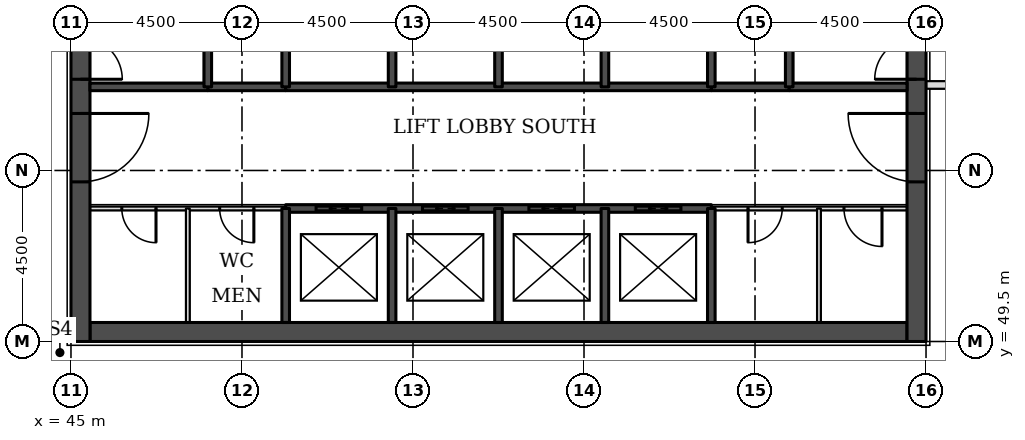
"""IFC4 building model, lengths in metres.
Left out: names, types, materials, properties, quantities, classifications, styles, units other than length and angle.
Written with IfcOpenShell. Run it as: python <this file> out.ifc"""

import sys

from ifc_helpers import new_model, si_unit, direction, frame, frame_2d, origin, place, context, subcontext, project, spatial, rectangle, extrude, element, fill, save


model = new_model("IFC4")
c1 = context("Model", 3, precision=1e-05, world=origin(), true_north=direction((0.0, 1.0)))
c2 = subcontext(c1, "Body", "Model", "MODEL_VIEW")
j1 = project(units=[si_unit("LENGTHUNIT", "METRE"), si_unit("PLANEANGLEUNIT", "RADIAN")], contexts=[c1])
p1 = place(None, origin())
s1 = spatial("IfcSite", under=j1, at=p1, CompositionType="ELEMENT")
p2 = place(p1, origin())
s2 = spatial("IfcBuilding", under=s1, at=p2, CompositionType="ELEMENT")
p3 = place(p2, frame((0.0, 0.0, 69.3)))
s3 = spatial("IfcBuildingStorey", under=s2, at=p3, CompositionType="ELEMENT", Elevation=69.3)
p4 = place(p3, frame((45.5, 49.75, 0.0), z_axis=(0.0, 0.0, 1.0), x_axis=(1.0, 0.0, 0.0)))
e1 = element("IfcWall", 1, at=p4, inside=s3, PredefinedType="SHEAR", context=c2, shape_type="SweptSolid", body=[
    extrude(rectangle(XDim=21.5, YDim=0.5, at=frame_2d((10.75, 0.0))), origin(), (0.0, 0.0, 1.0), 5.0),
])
p5 = place(p3, frame((45.25, 49.5, 0.0), z_axis=(0.0, 0.0, 1.0), x_axis=(0.0, 1.0, 0.0)))
e2 = element("IfcWall", 2, at=p5, inside=s3, PredefinedType="SHEAR", context=c2, shape_type="SweptSolid", body=[
    extrude(rectangle(XDim=22.5, YDim=0.5, at=frame_2d((11.25, 0.0))), origin(), (0.0, 0.0, 1.0), 5.0),
])
p6 = place(p5, frame((4.2, 0.0, 0.0)))
e3 = element("IfcOpeningElement", 3, at=p6, cuts=e2, PredefinedType="OPENING", context=c2, shape_type="SweptSolid", body=[
    extrude(rectangle(XDim=1.8, YDim=2.1, at=frame_2d((0.9, 1.05))), frame((0.0, 0.26, 0.0), z_axis=(0.0, -1.0, 0.0), x_axis=(1.0, 0.0, 0.0)), (0.0, 0.0, 1.0), 0.52),
])
p7 = place(p5, frame((6.9, 0.0, 0.0)))
e4 = element("IfcOpeningElement", 4, at=p7, cuts=e2, PredefinedType="OPENING", context=c2, shape_type="SweptSolid", body=[
    extrude(rectangle(XDim=1.1, YDim=2.1, at=frame_2d((0.55, 1.05))), frame((0.0, 0.26, 0.0), z_axis=(0.0, -1.0, 0.0), x_axis=(1.0, 0.0, 0.0)), (0.0, 0.0, 1.0), 0.52),
])
p8 = place(p5, frame((13.6, 0.0, 0.0)))
e5 = element("IfcOpeningElement", 5, at=p8, cuts=e2, PredefinedType="OPENING", context=c2, shape_type="SweptSolid", body=[
    extrude(rectangle(XDim=1.1, YDim=2.1, at=frame_2d((0.55, 1.05))), frame((0.0, 0.26, 0.0), z_axis=(0.0, -1.0, 0.0), x_axis=(1.0, 0.0, 0.0)), (0.0, 0.0, 1.0), 0.52),
])
p9 = place(p5, frame((16.5, 0.0, 0.0)))
e6 = element("IfcOpeningElement", 6, at=p9, cuts=e2, PredefinedType="OPENING", context=c2, shape_type="SweptSolid", body=[
    extrude(rectangle(XDim=1.8, YDim=2.1, at=frame_2d((0.9, 1.05))), frame((0.0, 0.26, 0.0), z_axis=(0.0, -1.0, 0.0), x_axis=(1.0, 0.0, 0.0)), (0.0, 0.0, 1.0), 0.52),
])
p10 = place(p3, frame((67.25, 49.5, 0.0), z_axis=(0.0, 0.0, 1.0), x_axis=(0.0, 1.0, 0.0)))
e7 = element("IfcWall", 7, at=p10, inside=s3, PredefinedType="SHEAR", context=c2, shape_type="SweptSolid", body=[
    extrude(rectangle(XDim=22.5, YDim=0.5, at=frame_2d((11.25, 0.0))), origin(), (0.0, 0.0, 1.0), 5.0),
])
p11 = place(p10, frame((4.2, 0.0, 0.0)))
e8 = element("IfcOpeningElement", 8, at=p11, cuts=e7, PredefinedType="OPENING", context=c2, shape_type="SweptSolid", body=[
    extrude(rectangle(XDim=1.8, YDim=2.1, at=frame_2d((0.9, 1.05))), frame((0.0, 0.26, 0.0), z_axis=(0.0, -1.0, 0.0), x_axis=(1.0, 0.0, 0.0)), (0.0, 0.0, 1.0), 0.52),
])
p12 = place(p10, frame((6.9, 0.0, 0.0)))
e9 = element("IfcOpeningElement", 9, at=p12, cuts=e7, PredefinedType="OPENING", context=c2, shape_type="SweptSolid", body=[
    extrude(rectangle(XDim=1.1, YDim=2.1, at=frame_2d((0.55, 1.05))), frame((0.0, 0.26, 0.0), z_axis=(0.0, -1.0, 0.0), x_axis=(1.0, 0.0, 0.0)), (0.0, 0.0, 1.0), 0.52),
])
p13 = place(p10, frame((13.6, 0.0, 0.0)))
e10 = element("IfcOpeningElement", 10, at=p13, cuts=e7, PredefinedType="OPENING", context=c2, shape_type="SweptSolid", body=[
    extrude(rectangle(XDim=1.1, YDim=2.1, at=frame_2d((0.55, 1.05))), frame((0.0, 0.26, 0.0), z_axis=(0.0, -1.0, 0.0), x_axis=(1.0, 0.0, 0.0)), (0.0, 0.0, 1.0), 0.52),
])
p14 = place(p10, frame((16.5, 0.0, 0.0)))
e11 = element("IfcOpeningElement", 11, at=p14, cuts=e7, PredefinedType="OPENING", context=c2, shape_type="SweptSolid", body=[
    extrude(rectangle(XDim=1.8, YDim=2.1, at=frame_2d((0.9, 1.05))), frame((0.0, 0.26, 0.0), z_axis=(0.0, -1.0, 0.0), x_axis=(1.0, 0.0, 0.0)), (0.0, 0.0, 1.0), 0.52),
])
p15 = place(p3, frame((67.5, 56.25, 0.0), z_axis=(0.0, 0.0, 1.0), x_axis=(1.0, 0.0, 0.0)))
e12 = element("IfcWall", 12, at=p15, inside=s3, PredefinedType="PARTITIONING", context=c2, shape_type="SweptSolid", body=[
    extrude(rectangle(XDim=2.0, YDim=0.2, at=frame_2d((1.0, 0.0))), origin(), (0.0, 0.0, 1.0), 4.85),
])
p16 = place(p3, frame((45.5, 53.0, 0.0), z_axis=(0.0, 0.0, 1.0), x_axis=(1.0, 0.0, 0.0)))
e13 = element("IfcWall", 13, at=p16, inside=s3, PredefinedType="PARTITIONING", context=c2, shape_type="SweptSolid", body=[
    extrude(rectangle(XDim=5.15, YDim=0.1, at=frame_2d((2.575, 0.0))), origin(), (0.0, 0.0, 1.0), 4.85),
])
p17 = place(p16, frame((0.837, 0.0, 0.0)))
e14 = element("IfcOpeningElement", 14, at=p17, cuts=e13, PredefinedType="OPENING", context=c2, shape_type="SweptSolid", body=[
    extrude(rectangle(XDim=0.9, YDim=2.1, at=frame_2d((0.45, 1.05))), frame((0.0, 0.06, 0.0), z_axis=(0.0, -1.0, 0.0), x_axis=(1.0, 0.0, 0.0)), (0.0, 0.0, 1.0), 0.12),
])
p18 = place(p16, frame((3.413, 0.0, 0.0)))
e15 = element("IfcOpeningElement", 15, at=p18, cuts=e13, PredefinedType="OPENING", context=c2, shape_type="SweptSolid", body=[
    extrude(rectangle(XDim=0.9, YDim=2.1, at=frame_2d((0.45, 1.05))), frame((0.0, 0.06, 0.0), z_axis=(0.0, -1.0, 0.0), x_axis=(1.0, 0.0, 0.0)), (0.0, 0.0, 1.0), 0.12),
])
p19 = place(p3, frame((61.85, 53.0, 0.0), z_axis=(0.0, 0.0, 1.0), x_axis=(1.0, 0.0, 0.0)))
e16 = element("IfcWall", 16, at=p19, inside=s3, PredefinedType="PARTITIONING", context=c2, shape_type="SweptSolid", body=[
    extrude(rectangle(XDim=5.15, YDim=0.1, at=frame_2d((2.575, 0.0))), origin(), (0.0, 0.0, 1.0), 4.85),
])
p20 = place(p19, frame((3.491, 0.0, 0.0)))
e17 = element("IfcOpeningElement", 17, at=p20, cuts=e16, PredefinedType="OPENING", context=c2, shape_type="SweptSolid", body=[
    extrude(rectangle(XDim=1.0, YDim=2.1, at=frame_2d((0.5, 1.05))), frame((0.0, 0.06, 0.0), z_axis=(0.0, -1.0, 0.0), x_axis=(1.0, 0.0, 0.0)), (0.0, 0.0, 1.0), 0.12),
])
p21 = place(p19, frame((0.966, 0.0, 0.0)))
e18 = element("IfcOpeningElement", 18, at=p21, cuts=e16, PredefinedType="OPENING", context=c2, shape_type="SweptSolid", body=[
    extrude(rectangle(XDim=0.9, YDim=2.1, at=frame_2d((0.45, 1.05))), frame((0.0, 0.06, 0.0), z_axis=(0.0, -1.0, 0.0), x_axis=(1.0, 0.0, 0.0)), (0.0, 0.0, 1.0), 0.12),
])
p22 = place(p3, frame((50.65, 53.0, 0.0), z_axis=(0.0, 0.0, 1.0), x_axis=(1.0, 0.0, 0.0)))
e19 = element("IfcWall", 19, at=p22, inside=s3, PredefinedType="SOLIDWALL", context=c2, shape_type="SweptSolid", body=[
    extrude(rectangle(XDim=11.2, YDim=0.2, at=frame_2d((5.6, 0.0))), origin(), (0.0, 0.0, 1.0), 4.85),
])
p23 = place(p22, frame((0.8, 0.0, 0.0)))
e20 = element("IfcOpeningElement", 20, at=p23, cuts=e19, PredefinedType="OPENING", context=c2, shape_type="SweptSolid", body=[
    extrude(rectangle(XDim=1.2, YDim=2.1, at=frame_2d((0.6, 1.05))), frame((0.0, 0.11, 0.0), z_axis=(0.0, -1.0, 0.0), x_axis=(1.0, 0.0, 0.0)), (0.0, 0.0, 1.0), 0.22),
])
p24 = place(p22, frame((3.6, 0.0, 0.0)))
e21 = element("IfcOpeningElement", 21, at=p24, cuts=e19, PredefinedType="OPENING", context=c2, shape_type="SweptSolid", body=[
    extrude(rectangle(XDim=1.2, YDim=2.1, at=frame_2d((0.6, 1.05))), frame((0.0, 0.11, 0.0), z_axis=(0.0, -1.0, 0.0), x_axis=(1.0, 0.0, 0.0)), (0.0, 0.0, 1.0), 0.22),
])
p25 = place(p22, frame((6.4, 0.0, 0.0)))
e22 = element("IfcOpeningElement", 22, at=p25, cuts=e19, PredefinedType="OPENING", context=c2, shape_type="SweptSolid", body=[
    extrude(rectangle(XDim=1.2, YDim=2.1, at=frame_2d((0.6, 1.05))), frame((0.0, 0.11, 0.0), z_axis=(0.0, -1.0, 0.0), x_axis=(1.0, 0.0, 0.0)), (0.0, 0.0, 1.0), 0.22),
])
p26 = place(p22, frame((9.2, 0.0, 0.0)))
e23 = element("IfcOpeningElement", 23, at=p26, cuts=e19, PredefinedType="OPENING", context=c2, shape_type="SweptSolid", body=[
    extrude(rectangle(XDim=1.2, YDim=2.1, at=frame_2d((0.6, 1.05))), frame((0.0, 0.11, 0.0), z_axis=(0.0, -1.0, 0.0), x_axis=(1.0, 0.0, 0.0)), (0.0, 0.0, 1.0), 0.22),
])
for number, where, z_axis, x_axis in (
    (24, (48.6, 56.2, 0.0), (0.0, 0.0, 1.0), (1.0, 0.0, 0.0)),
    (25, (61.85, 56.2, 0.0), (0.0, 0.0, 1.0), (1.0, 0.0, 0.0)),
):
    element("IfcWall", number, at=place(p3, frame(where, z_axis=z_axis, x_axis=x_axis)), inside=s3, PredefinedType="SOLIDWALL", context=c2, shape_type="SweptSolid", body=[
        extrude(rectangle(XDim=2.05, YDim=0.2, at=frame_2d((1.025, 0.0))), origin(), (0.0, 0.0, 1.0), 4.85),
    ])
p27 = place(p3, frame((45.5, 56.2, 0.0), z_axis=(0.0, 0.0, 1.0), x_axis=(1.0, 0.0, 0.0)))
e26 = element("IfcWall", 26, at=p27, inside=s3, PredefinedType="SOLIDWALL", context=c2, shape_type="SweptSolid", body=[
    extrude(rectangle(XDim=3.1, YDim=0.2, at=frame_2d((1.55, 0.0))), origin(), (0.0, 0.0, 1.0), 4.85),
])
p28 = place(p3, frame((50.65, 56.2, 0.0), z_axis=(0.0, 0.0, 1.0), x_axis=(1.0, 0.0, 0.0)))
e27 = element("IfcWall", 27, at=p28, inside=s3, PredefinedType="SOLIDWALL", context=c2, shape_type="SweptSolid", body=[
    extrude(rectangle(XDim=11.2, YDim=0.2, at=frame_2d((5.6, 0.0))), origin(), (0.0, 0.0, 1.0), 4.85),
])
p29 = place(p3, frame((63.9, 56.2, 0.0), z_axis=(0.0, 0.0, 1.0), x_axis=(1.0, 0.0, 0.0)))
e28 = element("IfcWall", 28, at=p29, inside=s3, PredefinedType="SOLIDWALL", context=c2, shape_type="SweptSolid", body=[
    extrude(rectangle(XDim=3.1, YDim=0.2, at=frame_2d((1.55, 0.0))), origin(), (0.0, 0.0, 1.0), 4.85),
])
p30 = place(p3, frame((48.075, 50.0, 0.0), z_axis=(0.0, 0.0, 1.0), x_axis=(0.0, 1.0, 0.0)))
e29 = element("IfcWall", 29, at=p30, inside=s3, PredefinedType="PARTITIONING", context=c2, shape_type="SweptSolid", body=[
    extrude(rectangle(XDim=3.0, YDim=0.1, at=frame_2d((1.5, 0.0))), origin(), (0.0, 0.0, 1.0), 4.85),
])
p31 = place(p3, frame((48.6, 56.2, 0.0), z_axis=(0.0, 0.0, 1.0), x_axis=(0.0, 1.0, 0.0)))
e30 = element("IfcWall", 30, at=p31, inside=s3, PredefinedType="SOLIDWALL", context=c2, shape_type="SweptSolid", body=[
    extrude(rectangle(XDim=5.8, YDim=0.2, at=frame_2d((2.9, 0.0))), origin(), (0.0, 0.0, 1.0), 4.85),
])
p32 = place(p3, frame((50.65, 50.0, 0.0), z_axis=(0.0, 0.0, 1.0), x_axis=(0.0, 1.0, 0.0)))
e31 = element("IfcWall", 31, at=p32, inside=s3, PredefinedType="SOLIDWALL", context=c2, shape_type="SweptSolid", body=[
    extrude(rectangle(XDim=3.0, YDim=0.2, at=frame_2d((1.5, 0.0))), origin(), (0.0, 0.0, 1.0), 4.85),
])
p33 = place(p3, frame((50.65, 56.2, 0.0), z_axis=(0.0, 0.0, 1.0), x_axis=(0.0, 1.0, 0.0)))
e32 = element("IfcWall", 32, at=p33, inside=s3, PredefinedType="SOLIDWALL", context=c2, shape_type="SweptSolid", body=[
    extrude(rectangle(XDim=2.8, YDim=0.2, at=frame_2d((1.4, 0.0))), origin(), (0.0, 0.0, 1.0), 4.85),
])
p34 = place(p3, frame((53.45, 50.0, 0.0), z_axis=(0.0, 0.0, 1.0), x_axis=(0.0, 1.0, 0.0)))
e33 = element("IfcWall", 33, at=p34, inside=s3, PredefinedType="SOLIDWALL", context=c2, shape_type="SweptSolid", body=[
    extrude(rectangle(XDim=3.0, YDim=0.2, at=frame_2d((1.5, 0.0))), origin(), (0.0, 0.0, 1.0), 4.85),
])
p35 = place(p3, frame((53.45, 56.2, 0.0), z_axis=(0.0, 0.0, 1.0), x_axis=(0.0, 1.0, 0.0)))
e34 = element("IfcWall", 34, at=p35, inside=s3, PredefinedType="SOLIDWALL", context=c2, shape_type="SweptSolid", body=[
    extrude(rectangle(XDim=2.8, YDim=0.2, at=frame_2d((1.4, 0.0))), origin(), (0.0, 0.0, 1.0), 4.85),
])
p36 = place(p3, frame((56.25, 50.0, 0.0), z_axis=(0.0, 0.0, 1.0), x_axis=(0.0, 1.0, 0.0)))
e35 = element("IfcWall", 35, at=p36, inside=s3, PredefinedType="SOLIDWALL", context=c2, shape_type="SweptSolid", body=[
    extrude(rectangle(XDim=3.0, YDim=0.2, at=frame_2d((1.5, 0.0))), origin(), (0.0, 0.0, 1.0), 4.85),
])
p37 = place(p3, frame((56.25, 56.2, 0.0), z_axis=(0.0, 0.0, 1.0), x_axis=(0.0, 1.0, 0.0)))
e36 = element("IfcWall", 36, at=p37, inside=s3, PredefinedType="SOLIDWALL", context=c2, shape_type="SweptSolid", body=[
    extrude(rectangle(XDim=2.8, YDim=0.2, at=frame_2d((1.4, 0.0))), origin(), (0.0, 0.0, 1.0), 4.85),
])
p38 = place(p3, frame((59.05, 50.0, 0.0), z_axis=(0.0, 0.0, 1.0), x_axis=(0.0, 1.0, 0.0)))
e37 = element("IfcWall", 37, at=p38, inside=s3, PredefinedType="SOLIDWALL", context=c2, shape_type="SweptSolid", body=[
    extrude(rectangle(XDim=3.0, YDim=0.2, at=frame_2d((1.5, 0.0))), origin(), (0.0, 0.0, 1.0), 4.85),
])
p39 = place(p3, frame((59.05, 56.2, 0.0), z_axis=(0.0, 0.0, 1.0), x_axis=(0.0, 1.0, 0.0)))
e38 = element("IfcWall", 38, at=p39, inside=s3, PredefinedType="SOLIDWALL", context=c2, shape_type="SweptSolid", body=[
    extrude(rectangle(XDim=2.8, YDim=0.2, at=frame_2d((1.4, 0.0))), origin(), (0.0, 0.0, 1.0), 4.85),
])
p40 = place(p3, frame((61.85, 50.0, 0.0), z_axis=(0.0, 0.0, 1.0), x_axis=(0.0, 1.0, 0.0)))
e39 = element("IfcWall", 39, at=p40, inside=s3, PredefinedType="SOLIDWALL", context=c2, shape_type="SweptSolid", body=[
    extrude(rectangle(XDim=3.0, YDim=0.2, at=frame_2d((1.5, 0.0))), origin(), (0.0, 0.0, 1.0), 4.85),
])
p41 = place(p3, frame((61.85, 56.2, 0.0), z_axis=(0.0, 0.0, 1.0), x_axis=(0.0, 1.0, 0.0)))
e40 = element("IfcWall", 40, at=p41, inside=s3, PredefinedType="SOLIDWALL", context=c2, shape_type="SweptSolid", body=[
    extrude(rectangle(XDim=2.8, YDim=0.2, at=frame_2d((1.4, 0.0))), origin(), (0.0, 0.0, 1.0), 4.85),
])
p42 = place(p3, frame((63.9, 56.2, 0.0), z_axis=(0.0, 0.0, 1.0), x_axis=(0.0, 1.0, 0.0)))
e41 = element("IfcWall", 41, at=p42, inside=s3, PredefinedType="SOLIDWALL", context=c2, shape_type="SweptSolid", body=[
    extrude(rectangle(XDim=5.8, YDim=0.2, at=frame_2d((2.9, 0.0))), origin(), (0.0, 0.0, 1.0), 4.85),
])
p43 = place(p3, frame((64.683, 50.0, 0.0), z_axis=(0.0, 0.0, 1.0), x_axis=(0.0, 1.0, 0.0)))
e42 = element("IfcWall", 42, at=p43, inside=s3, PredefinedType="PARTITIONING", context=c2, shape_type="SweptSolid", body=[
    extrude(rectangle(XDim=3.0, YDim=0.1, at=frame_2d((1.5, 0.0))), origin(), (0.0, 0.0, 1.0), 4.85),
])
p44 = place(p23, origin())
e43 = element("IfcDoor", 43, at=p44, inside=s3, OperationType="DOUBLE_DOOR_SLIDING", PredefinedType="DOOR", context=c2, shape_type="SweptSolid", body=[
    extrude(rectangle(XDim=1.2, YDim=2.1, at=frame_2d((0.6, 1.05))), frame((0.0, 0.025, 0.0), z_axis=(0.0, -1.0, 0.0), x_axis=(1.0, 0.0, 0.0)), (0.0, 0.0, 1.0), 0.05),
])
fill(e20, e43)
p45 = place(p24, origin())
e44 = element("IfcDoor", 44, at=p45, inside=s3, OperationType="DOUBLE_DOOR_SLIDING", PredefinedType="DOOR", context=c2, shape_type="SweptSolid", body=[
    extrude(rectangle(XDim=1.2, YDim=2.1, at=frame_2d((0.6, 1.05))), frame((0.0, 0.025, 0.0), z_axis=(0.0, -1.0, 0.0), x_axis=(1.0, 0.0, 0.0)), (0.0, 0.0, 1.0), 0.05),
])
fill(e21, e44)
p46 = place(p25, origin())
e45 = element("IfcDoor", 45, at=p46, inside=s3, OperationType="DOUBLE_DOOR_SLIDING", PredefinedType="DOOR", context=c2, shape_type="SweptSolid", body=[
    extrude(rectangle(XDim=1.2, YDim=2.1, at=frame_2d((0.6, 1.05))), frame((0.0, 0.025, 0.0), z_axis=(0.0, -1.0, 0.0), x_axis=(1.0, 0.0, 0.0)), (0.0, 0.0, 1.0), 0.05),
])
fill(e22, e45)
p47 = place(p26, origin())
e46 = element("IfcDoor", 46, at=p47, inside=s3, OperationType="DOUBLE_DOOR_SLIDING", PredefinedType="DOOR", context=c2, shape_type="SweptSolid", body=[
    extrude(rectangle(XDim=1.2, YDim=2.1, at=frame_2d((0.6, 1.05))), frame((0.0, 0.025, 0.0), z_axis=(0.0, -1.0, 0.0), x_axis=(1.0, 0.0, 0.0)), (0.0, 0.0, 1.0), 0.05),
])
fill(e23, e46)
p48 = place(p6, frame((1.8, 0.0, 0.0), z_axis=(0.0, 0.0, 1.0), x_axis=(-1.0, 0.0, 0.0)))
e47 = element("IfcDoor", 47, at=p48, inside=s3, OperationType="SINGLE_SWING_LEFT", PredefinedType="DOOR", context=c2, shape_type="SweptSolid", body=[
    extrude(rectangle(XDim=1.8, YDim=2.1, at=frame_2d((0.9, 1.05))), frame((0.0, 0.025, 0.0), z_axis=(0.0, -1.0, 0.0), x_axis=(1.0, 0.0, 0.0)), (0.0, 0.0, 1.0), 0.05),
])
fill(e3, e47)
p49 = place(p7, frame((1.1, 0.0, 0.0), z_axis=(0.0, 0.0, 1.0), x_axis=(-1.0, 0.0, 0.0)))
e48 = element("IfcDoor", 48, at=p49, inside=s3, OperationType="SINGLE_SWING_RIGHT", PredefinedType="DOOR", context=c2, shape_type="SweptSolid", body=[
    extrude(rectangle(XDim=1.1, YDim=2.1, at=frame_2d((0.55, 1.05))), frame((0.0, 0.025, 0.0), z_axis=(0.0, -1.0, 0.0), x_axis=(1.0, 0.0, 0.0)), (0.0, 0.0, 1.0), 0.05),
])
fill(e4, e48)
p50 = place(p11, origin())
e49 = element("IfcDoor", 49, at=p50, inside=s3, OperationType="SINGLE_SWING_RIGHT", PredefinedType="DOOR", context=c2, shape_type="SweptSolid", body=[
    extrude(rectangle(XDim=1.8, YDim=2.1, at=frame_2d((0.9, 1.05))), frame((0.0, 0.025, 0.0), z_axis=(0.0, -1.0, 0.0), x_axis=(1.0, 0.0, 0.0)), (0.0, 0.0, 1.0), 0.05),
])
fill(e8, e49)
p51 = place(p12, origin())
e50 = element("IfcDoor", 50, at=p51, inside=s3, OperationType="SINGLE_SWING_LEFT", PredefinedType="DOOR", context=c2, shape_type="SweptSolid", body=[
    extrude(rectangle(XDim=1.1, YDim=2.1, at=frame_2d((0.55, 1.05))), frame((0.0, 0.025, 0.0), z_axis=(0.0, -1.0, 0.0), x_axis=(1.0, 0.0, 0.0)), (0.0, 0.0, 1.0), 0.05),
])
fill(e9, e50)
p52 = place(p20, frame((1.0, 0.0, 0.0), z_axis=(0.0, 0.0, 1.0), x_axis=(-1.0, 0.0, 0.0)))
e51 = element("IfcDoor", 51, at=p52, inside=s3, OperationType="SINGLE_SWING_LEFT", PredefinedType="DOOR", context=c2, shape_type="SweptSolid", body=[
    extrude(rectangle(XDim=1.0, YDim=2.1, at=frame_2d((0.5, 1.05))), frame((0.0, 0.025, 0.0), z_axis=(0.0, -1.0, 0.0), x_axis=(1.0, 0.0, 0.0)), (0.0, 0.0, 1.0), 0.05),
])
fill(e17, e51)
p53 = place(p21, frame((0.9, 0.0, 0.0), z_axis=(0.0, 0.0, 1.0), x_axis=(-1.0, 0.0, 0.0)))
e52 = element("IfcDoor", 52, at=p53, inside=s3, OperationType="SINGLE_SWING_RIGHT", PredefinedType="DOOR", context=c2, shape_type="SweptSolid", body=[
    extrude(rectangle(XDim=0.9, YDim=2.1, at=frame_2d((0.45, 1.05))), frame((0.0, 0.025, 0.0), z_axis=(0.0, -1.0, 0.0), x_axis=(1.0, 0.0, 0.0)), (0.0, 0.0, 1.0), 0.05),
])
fill(e18, e52)
p54 = place(p17, frame((0.9, 0.0, 0.0), z_axis=(0.0, 0.0, 1.0), x_axis=(-1.0, 0.0, 0.0)))
e53 = element("IfcDoor", 53, at=p54, inside=s3, OperationType="SINGLE_SWING_LEFT", PredefinedType="DOOR", context=c2, shape_type="SweptSolid", body=[
    extrude(rectangle(XDim=0.9, YDim=2.1, at=frame_2d((0.45, 1.05))), frame((0.0, 0.025, 0.0), z_axis=(0.0, -1.0, 0.0), x_axis=(1.0, 0.0, 0.0)), (0.0, 0.0, 1.0), 0.05),
])
fill(e14, e53)
p55 = place(p18, frame((0.9, 0.0, 0.0), z_axis=(0.0, 0.0, 1.0), x_axis=(-1.0, 0.0, 0.0)))
e54 = element("IfcDoor", 54, at=p55, inside=s3, OperationType="SINGLE_SWING_LEFT", PredefinedType="DOOR", context=c2, shape_type="SweptSolid", body=[
    extrude(rectangle(XDim=0.9, YDim=2.1, at=frame_2d((0.45, 1.05))), frame((0.0, 0.025, 0.0), z_axis=(0.0, -1.0, 0.0), x_axis=(1.0, 0.0, 0.0)), (0.0, 0.0, 1.0), 0.05),
])
fill(e15, e54)
save(model, sys.argv[1])
